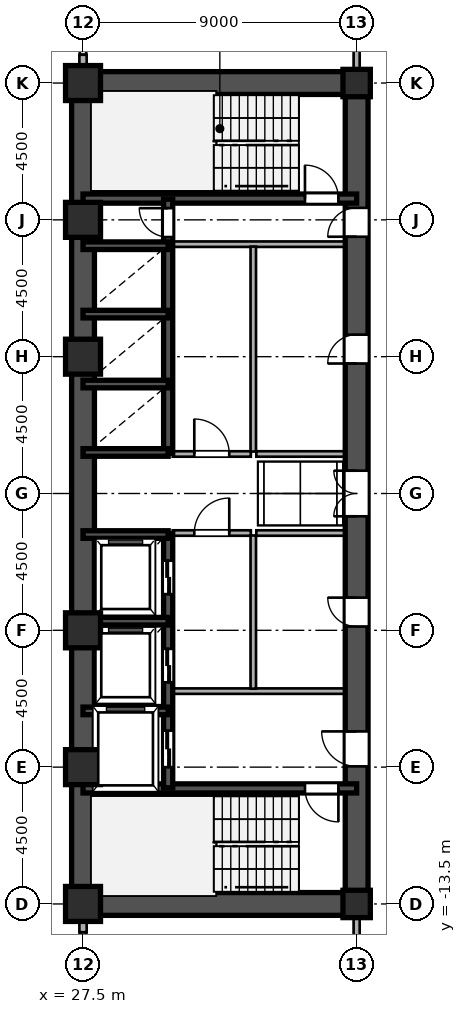
"""IFC4 building model, lengths in metres.
Left out: names, types, materials, properties, quantities, classifications, styles, units other than length and angle.
Written with IfcOpenShell. Run it as: python <this file> out.ifc"""

import sys

from ifc_helpers import new_model, si_unit, direction, frame, frame_2d, origin, origin_2d, place, context, subcontext, project, spatial, rectangle, hollow_rectangle, i_section, extrude, source, transform, mapped, element, fill, save


model = new_model("IFC4")
c1 = context("Model", 3, precision=1e-05, world=origin(), true_north=direction((0.0, 1.0)))
c2 = subcontext(c1, "Body", "Model", "MODEL_VIEW")
j1 = project(units=[si_unit("LENGTHUNIT", "METRE"), si_unit("PLANEANGLEUNIT", "RADIAN")], contexts=[c1])
p1 = place(None, origin())
s1 = spatial("IfcSite", under=j1, at=p1, CompositionType="ELEMENT")
p2 = place(p1, origin())
s2 = spatial("IfcBuilding", under=s1, at=p2, CompositionType="ELEMENT")
p3 = place(p2, frame((0.0, 0.0, 18.9)))
s3 = spatial("IfcBuildingStorey", under=s2, at=p3, CompositionType="ELEMENT", Elevation=18.9)
m1 = source(origin(), c2, "Body", "SweptSolid", [
    extrude(hollow_rectangle(XDim=1.15, YDim=1.15, WallThickness=0.048, at=origin_2d()), origin(), (0.0, 0.0, 1.0), 3.6),
])
for number, where, z_axis, x_axis in (
    (1, (27.5, -13.5, 0.0), (0.0, 0.0, 1.0), (1.0, 0.0, 0.0)),
    (2, (27.5, -9.0, 0.0), (0.0, 0.0, 1.0), (1.0, 0.0, 0.0)),
    (3, (27.5, -4.5, 0.0), (0.0, 0.0, 1.0), (1.0, 0.0, 0.0)),
    (4, (27.5, 4.5, 0.0), (0.0, 0.0, 1.0), (1.0, 0.0, 0.0)),
    (5, (27.5, 9.0, 0.0), (0.0, 0.0, 1.0), (1.0, 0.0, 0.0)),
    (6, (27.5, 13.5, 0.0), (0.0, 0.0, 1.0), (1.0, 0.0, 0.0)),
):
    element("IfcColumn", number, at=place(p3, frame(where, z_axis=z_axis, x_axis=x_axis)), inside=s3, PredefinedType="COLUMN", context=c2, shape_type="MappedRepresentation", body=[
        mapped(m1, transform((0.0, 0.0, 0.0), scale=1.0)),
    ])
m2 = source(origin(), c2, "Body", "SweptSolid", [
    extrude(i_section(OverallWidth=0.9, OverallDepth=0.9, WebThickness=0.036, FlangeThickness=0.055, at=origin_2d()), origin(), (0.0, 0.0, 1.0), 3.6),
])
for number, where, z_axis, x_axis in (
    (7, (36.5, -13.5, 0.0), (0.0, 0.0, 1.0), (1.0, 0.0, 0.0)),
    (8, (36.5, 13.5, 0.0), (0.0, 0.0, 1.0), (1.0, 0.0, 0.0)),
):
    element("IfcColumn", number, at=place(p3, frame(where, z_axis=z_axis, x_axis=x_axis)), inside=s3, PredefinedType="COLUMN", context=c2, shape_type="MappedRepresentation", body=[
        mapped(m2, transform((0.0, 0.0, 0.0), scale=1.0)),
    ])
for number, where, z_axis, x_axis in (
    (9, (27.5, -14.43, 0.0), (0.0, 0.0, 1.0), (0.0, 1.0, 0.0)),
    (10, (27.5, 13.88, 0.0), (0.0, 0.0, 1.0), (0.0, 1.0, 0.0)),
):
    element("IfcWall", number, at=place(p3, frame(where, z_axis=z_axis, x_axis=x_axis)), inside=s3, PredefinedType="SOLIDWALL", context=c2, shape_type="SweptSolid", body=[
        extrude(rectangle(XDim=0.55, YDim=0.24, at=frame_2d((0.275, 0.0))), origin(), (0.0, 0.0, 1.0), 2.88),
    ])
for number, where, z_axis, x_axis in (
    (11, (27.5, -13.5, 0.0), (0.0, 0.0, 1.0), (0.0, 1.0, 0.0)),
    (12, (27.5, 1.3, 0.0), (0.0, 0.0, 1.0), (0.0, 1.0, 0.0)),
):
    element("IfcWall", number, at=place(p3, frame(where, z_axis=z_axis, x_axis=x_axis)), inside=s3, PredefinedType="SHEAR", context=c2, shape_type="SweptSolid", body=[
        extrude(rectangle(XDim=12.2, YDim=0.75, at=frame_2d((6.1, 0.0))), origin(), (0.0, 0.0, 1.0), 3.38),
    ])
p4 = place(p3, frame((27.5, -1.3, 0.0), z_axis=(0.0, 0.0, 1.0), x_axis=(0.0, 1.0, 0.0)))
e13 = element("IfcWall", 13, at=p4, inside=s3, PredefinedType="SHEAR", context=c2, shape_type="SweptSolid", body=[
    extrude(rectangle(XDim=2.6, YDim=0.75, at=frame_2d((1.3, 0.0))), origin(), (0.0, 0.0, 1.0), 3.38),
])
for number, where, z_axis, x_axis in (
    (14, (27.5, -13.5, 0.0), (0.0, 0.0, 1.0), (1.0, 0.0, 0.0)),
    (15, (27.5, 13.5, 0.0), (0.0, 0.0, 1.0), (1.0, 0.0, 0.0)),
):
    element("IfcWall", number, at=place(p3, frame(where, z_axis=z_axis, x_axis=x_axis)), inside=s3, PredefinedType="SHEAR", context=c2, shape_type="SweptSolid", body=[
        extrude(rectangle(XDim=9.0, YDim=0.75, at=frame_2d((4.5, 0.0))), origin(), (0.0, 0.0, 1.0), 3.38),
    ])
p5 = place(p3, frame((36.5, -13.65, 0.0), z_axis=(0.0, 0.0, 1.0), x_axis=(0.0, 1.0, 0.0)))
e16 = element("IfcWall", 16, at=p5, inside=s3, PredefinedType="SHEAR", context=c2, shape_type="SweptSolid", body=[
    extrude(rectangle(XDim=7.15, YDim=0.75, at=frame_2d((3.575, 0.0))), origin(), (0.0, 0.0, 1.0), 3.38),
])
p6 = place(p5, frame((4.675, 0.0, 0.0)))
e17 = element("IfcOpeningElement", 17, at=p6, cuts=e16, PredefinedType="OPENING", context=c2, shape_type="SweptSolid", body=[
    extrude(rectangle(XDim=1.15, YDim=2.2, at=frame_2d((0.575, 1.1))), frame((0.0, 0.385, 0.0), z_axis=(0.0, -1.0, 0.0), x_axis=(1.0, 0.0, 0.0)), (0.0, 0.0, 1.0), 0.77),
])
p7 = place(p3, frame((36.5, -1.3, 0.0), z_axis=(0.0, 0.0, 1.0), x_axis=(0.0, 1.0, 0.0)))
e18 = element("IfcWall", 18, at=p7, inside=s3, PredefinedType="SHEAR", context=c2, shape_type="SweptSolid", body=[
    extrude(rectangle(XDim=2.6, YDim=0.75, at=frame_2d((1.3, 0.0))), origin(), (0.0, 0.0, 1.0), 3.38),
])
p8 = place(p7, frame((0.55, 0.0, 0.0)))
e19 = element("IfcOpeningElement", 19, at=p8, cuts=e18, PredefinedType="OPENING", context=c2, shape_type="SweptSolid", body=[
    extrude(rectangle(XDim=1.5, YDim=2.3, at=frame_2d((0.75, 1.15))), frame((0.0, 0.385, 0.0), z_axis=(0.0, -1.0, 0.0), x_axis=(1.0, 0.0, 0.0)), (0.0, 0.0, 1.0), 0.77),
])
p9 = place(p3, frame((36.5, 8.2, 0.0), z_axis=(0.0, 0.0, 1.0), x_axis=(0.0, 1.0, 0.0)))
e20 = element("IfcWall", 20, at=p9, inside=s3, PredefinedType="SHEAR", context=c2, shape_type="SweptSolid", body=[
    extrude(rectangle(XDim=5.45, YDim=0.75, at=frame_2d((2.725, 0.0))), origin(), (0.0, 0.0, 1.0), 3.38),
])
p10 = place(p9, frame((0.245, 0.0, 0.0)))
e21 = element("IfcOpeningElement", 21, at=p10, cuts=e20, PredefinedType="OPENING", context=c2, shape_type="SweptSolid", body=[
    extrude(rectangle(XDim=0.95, YDim=2.15, at=frame_2d((0.475, 1.075))), frame((0.0, 0.385, 0.0), z_axis=(0.0, -1.0, 0.0), x_axis=(1.0, 0.0, 0.0)), (0.0, 0.0, 1.0), 0.77),
])
p11 = place(p3, frame((36.5, -6.5, 0.0), z_axis=(0.0, 0.0, 1.0), x_axis=(0.0, 1.0, 0.0)))
e22 = element("IfcWall", 22, at=p11, inside=s3, PredefinedType="SHEAR", context=c2, shape_type="SweptSolid", body=[
    extrude(rectangle(XDim=5.2, YDim=0.75, at=frame_2d((2.6, 0.0))), origin(), (0.0, 0.0, 1.0), 3.38),
])
p12 = place(p11, frame((2.125, 0.0, 0.0)))
e23 = element("IfcOpeningElement", 23, at=p12, cuts=e22, PredefinedType="OPENING", context=c2, shape_type="SweptSolid", body=[
    extrude(rectangle(XDim=0.95, YDim=2.15, at=frame_2d((0.475, 1.075))), frame((0.0, 0.385, 0.0), z_axis=(0.0, -1.0, 0.0), x_axis=(1.0, 0.0, 0.0)), (0.0, 0.0, 1.0), 0.77),
])
p13 = place(p3, frame((36.5, 1.3, 0.0), z_axis=(0.0, 0.0, 1.0), x_axis=(0.0, 1.0, 0.0)))
e24 = element("IfcWall", 24, at=p13, inside=s3, PredefinedType="SHEAR", context=c2, shape_type="SweptSolid", body=[
    extrude(rectangle(XDim=6.9, YDim=0.75, at=frame_2d((3.45, 0.0))), origin(), (0.0, 0.0, 1.0), 3.38),
])
p14 = place(p13, frame((2.975, 0.0, 0.0)))
e25 = element("IfcOpeningElement", 25, at=p14, cuts=e24, PredefinedType="OPENING", context=c2, shape_type="SweptSolid", body=[
    extrude(rectangle(XDim=0.95, YDim=2.15, at=frame_2d((0.475, 1.075))), frame((0.0, 0.385, 0.0), z_axis=(0.0, -1.0, 0.0), x_axis=(1.0, 0.0, 0.0)), (0.0, 0.0, 1.0), 0.77),
])
p15 = place(p3, frame((27.5, -9.7, 0.0), z_axis=(0.0, 0.0, 1.0), x_axis=(1.0, 0.0, 0.0)))
e26 = element("IfcWall", 26, at=p15, inside=s3, PredefinedType="SHEAR", context=c2, shape_type="SweptSolid", body=[
    extrude(rectangle(XDim=9.0, YDim=0.3, at=frame_2d((4.5, 0.0))), origin(), (0.0, 0.0, 1.0), 3.38),
])
p16 = place(p15, frame((7.3, 0.0, 0.0)))
e27 = element("IfcOpeningElement", 27, at=p16, cuts=e26, PredefinedType="OPENING", context=c2, shape_type="SweptSolid", body=[
    extrude(rectangle(XDim=1.1, YDim=2.2, at=frame_2d((0.55, 1.1))), frame((0.0, 0.16, 0.0), z_axis=(0.0, -1.0, 0.0), x_axis=(1.0, 0.0, 0.0)), (0.0, 0.0, 1.0), 0.32),
])
p17 = place(p3, frame((27.5, 9.7, 0.0), z_axis=(0.0, 0.0, 1.0), x_axis=(1.0, 0.0, 0.0)))
e28 = element("IfcWall", 28, at=p17, inside=s3, PredefinedType="SHEAR", context=c2, shape_type="SweptSolid", body=[
    extrude(rectangle(XDim=9.0, YDim=0.3, at=frame_2d((4.5, 0.0))), origin(), (0.0, 0.0, 1.0), 3.38),
])
p18 = place(p17, frame((7.3, 0.0, 0.0)))
e29 = element("IfcOpeningElement", 29, at=p18, cuts=e28, PredefinedType="OPENING", context=c2, shape_type="SweptSolid", body=[
    extrude(rectangle(XDim=1.1, YDim=2.2, at=frame_2d((0.55, 1.1))), frame((0.0, 0.16, 0.0), z_axis=(0.0, -1.0, 0.0), x_axis=(1.0, 0.0, 0.0)), (0.0, 0.0, 1.0), 0.32),
])
for number, where, z_axis, x_axis in (
    (30, (27.5, -7.15, 0.0), (0.0, 0.0, 1.0), (1.0, 0.0, 0.0)),
    (31, (27.5, -4.2, 0.0), (0.0, 0.0, 1.0), (1.0, 0.0, 0.0)),
    (32, (27.5, -1.35, 0.0), (0.0, 0.0, 1.0), (1.0, 0.0, 0.0)),
    (33, (27.5, 1.35, 0.0), (0.0, 0.0, 1.0), (1.0, 0.0, 0.0)),
    (34, (27.5, 3.6, 0.0), (0.0, 0.0, 1.0), (1.0, 0.0, 0.0)),
    (35, (27.5, 5.9, 0.0), (0.0, 0.0, 1.0), (1.0, 0.0, 0.0)),
    (36, (27.5, 8.15, 0.0), (0.0, 0.0, 1.0), (1.0, 0.0, 0.0)),
):
    element("IfcWall", number, at=place(p3, frame(where, z_axis=z_axis, x_axis=x_axis)), inside=s3, PredefinedType="SHEAR", context=c2, shape_type="SweptSolid", body=[
        extrude(rectangle(XDim=2.8, YDim=0.25, at=frame_2d((1.4, 0.0))), origin(), (0.0, 0.0, 1.0), 3.38),
    ])
p19 = place(p3, frame((30.3, -9.68, 0.0), z_axis=(0.0, 0.0, 1.0), x_axis=(0.0, 1.0, 0.0)))
e37 = element("IfcWall", 37, at=p19, inside=s3, PredefinedType="SHEAR", context=c2, shape_type="SweptSolid", body=[
    extrude(rectangle(XDim=2.56, YDim=0.3, at=frame_2d((1.28, 0.0))), origin(), (0.0, 0.0, 1.0), 3.38),
])
p20 = place(p19, frame((0.68, 0.0, 0.0)))
e38 = element("IfcOpeningElement", 38, at=p20, cuts=e37, PredefinedType="OPENING", context=c2, shape_type="SweptSolid", body=[
    extrude(rectangle(XDim=1.2, YDim=2.25, at=frame_2d((0.6, 1.125))), frame((0.0, 0.16, 0.0), z_axis=(0.0, -1.0, 0.0), x_axis=(1.0, 0.0, 0.0)), (0.0, 0.0, 1.0), 0.32),
])
p21 = place(p3, frame((30.3, -7.12, 0.0), z_axis=(0.0, 0.0, 1.0), x_axis=(0.0, 1.0, 0.0)))
e39 = element("IfcWall", 39, at=p21, inside=s3, PredefinedType="SHEAR", context=c2, shape_type="SweptSolid", body=[
    extrude(rectangle(XDim=2.92, YDim=0.3, at=frame_2d((1.46, 0.0))), origin(), (0.0, 0.0, 1.0), 3.38),
])
p22 = place(p21, frame((0.91, 0.0, 0.0)))
e40 = element("IfcOpeningElement", 40, at=p22, cuts=e39, PredefinedType="OPENING", context=c2, shape_type="SweptSolid", body=[
    extrude(rectangle(XDim=1.1, YDim=2.2, at=frame_2d((0.55, 1.1))), frame((0.0, 0.16, 0.0), z_axis=(0.0, -1.0, 0.0), x_axis=(1.0, 0.0, 0.0)), (0.0, 0.0, 1.0), 0.32),
])
p23 = place(p3, frame((30.3, -4.2, 0.0), z_axis=(0.0, 0.0, 1.0), x_axis=(0.0, 1.0, 0.0)))
e41 = element("IfcWall", 41, at=p23, inside=s3, PredefinedType="SHEAR", context=c2, shape_type="SweptSolid", body=[
    extrude(rectangle(XDim=2.88, YDim=0.3, at=frame_2d((1.44, 0.0))), origin(), (0.0, 0.0, 1.0), 3.38),
])
p24 = place(p23, frame((0.89, 0.0, 0.0)))
e42 = element("IfcOpeningElement", 42, at=p24, cuts=e41, PredefinedType="OPENING", context=c2, shape_type="SweptSolid", body=[
    extrude(rectangle(XDim=1.1, YDim=2.2, at=frame_2d((0.55, 1.1))), frame((0.0, 0.16, 0.0), z_axis=(0.0, -1.0, 0.0), x_axis=(1.0, 0.0, 0.0)), (0.0, 0.0, 1.0), 0.32),
])
p25 = place(p3, frame((30.3, 1.32, 0.0), z_axis=(0.0, 0.0, 1.0), x_axis=(0.0, 1.0, 0.0)))
e43 = element("IfcWall", 43, at=p25, inside=s3, PredefinedType="SHEAR", context=c2, shape_type="SweptSolid", body=[
    extrude(rectangle(XDim=2.28, YDim=0.3, at=frame_2d((1.14, 0.0))), origin(), (0.0, 0.0, 1.0), 3.38),
])
p26 = place(p3, frame((30.3, 3.6, 0.0), z_axis=(0.0, 0.0, 1.0), x_axis=(0.0, 1.0, 0.0)))
e44 = element("IfcWall", 44, at=p26, inside=s3, PredefinedType="SHEAR", context=c2, shape_type="SweptSolid", body=[
    extrude(rectangle(XDim=2.3, YDim=0.3, at=frame_2d((1.15, 0.0))), origin(), (0.0, 0.0, 1.0), 3.38),
])
p27 = place(p3, frame((30.3, 5.9, 0.0), z_axis=(0.0, 0.0, 1.0), x_axis=(0.0, 1.0, 0.0)))
e45 = element("IfcWall", 45, at=p27, inside=s3, PredefinedType="SHEAR", context=c2, shape_type="SweptSolid", body=[
    extrude(rectangle(XDim=2.25, YDim=0.3, at=frame_2d((1.125, 0.0))), origin(), (0.0, 0.0, 1.0), 3.38),
])
p28 = place(p3, frame((30.3, 8.15, 0.0), z_axis=(0.0, 0.0, 1.0), x_axis=(0.0, 1.0, 0.0)))
e46 = element("IfcWall", 46, at=p28, inside=s3, PredefinedType="SHEAR", context=c2, shape_type="SweptSolid", body=[
    extrude(rectangle(XDim=1.53, YDim=0.3, at=frame_2d((0.765, 0.0))), origin(), (0.0, 0.0, 1.0), 3.38),
])
p29 = place(p28, frame((0.285, 0.0, 0.0)))
e47 = element("IfcOpeningElement", 47, at=p29, cuts=e46, PredefinedType="OPENING", context=c2, shape_type="SweptSolid", body=[
    extrude(rectangle(XDim=0.95, YDim=2.15, at=frame_2d((0.475, 1.075))), frame((0.0, 0.16, 0.0), z_axis=(0.0, -1.0, 0.0), x_axis=(1.0, 0.0, 0.0)), (0.0, 0.0, 1.0), 0.32),
])
for number, where, z_axis, x_axis in (
    (48, (30.45, -6.5, 0.0), (0.0, 0.0, 1.0), (1.0, 0.0, 0.0)),
    (49, (30.45, 8.2, 0.0), (0.0, 0.0, 1.0), (1.0, 0.0, 0.0)),
):
    element("IfcWall", number, at=place(p3, frame(where, z_axis=z_axis, x_axis=x_axis)), inside=s3, PredefinedType="PARTITIONING", context=c2, shape_type="SweptSolid", body=[
        extrude(rectangle(XDim=5.7, YDim=0.18, at=frame_2d((2.85, 0.0))), origin(), (0.0, 0.0, 1.0), 3.38),
    ])
p30 = place(p3, frame((33.1, -6.42, 0.0), z_axis=(0.0, 0.0, 1.0), x_axis=(0.0, 1.0, 0.0)))
e50 = element("IfcWall", 50, at=p30, inside=s3, PredefinedType="PARTITIONING", context=c2, shape_type="SweptSolid", body=[
    extrude(rectangle(XDim=5.04, YDim=0.18, at=frame_2d((2.52, 0.0))), origin(), (0.0, 0.0, 1.0), 3.38),
])
p31 = place(p3, frame((33.1, 1.38, 0.0), z_axis=(0.0, 0.0, 1.0), x_axis=(0.0, 1.0, 0.0)))
e51 = element("IfcWall", 51, at=p31, inside=s3, PredefinedType="PARTITIONING", context=c2, shape_type="SweptSolid", body=[
    extrude(rectangle(XDim=6.74, YDim=0.18, at=frame_2d((3.37, 0.0))), origin(), (0.0, 0.0, 1.0), 3.38),
])
p32 = place(p3, frame((30.45, -1.3, 0.0), z_axis=(0.0, 0.0, 1.0), x_axis=(1.0, 0.0, 0.0)))
e52 = element("IfcWall", 52, at=p32, inside=s3, PredefinedType="PARTITIONING", context=c2, shape_type="SweptSolid", body=[
    extrude(rectangle(XDim=2.57, YDim=0.18, at=frame_2d((1.285, 0.0))), origin(), (0.0, 0.0, 1.0), 3.38),
])
p33 = place(p32, frame((0.71, 0.0, 0.0)))
e53 = element("IfcOpeningElement", 53, at=p33, cuts=e52, PredefinedType="OPENING", context=c2, shape_type="SweptSolid", body=[
    extrude(rectangle(XDim=1.15, YDim=2.2, at=frame_2d((0.575, 1.1))), frame((0.0, 0.1, 0.0), z_axis=(0.0, -1.0, 0.0), x_axis=(1.0, 0.0, 0.0)), (0.0, 0.0, 1.0), 0.2),
])
p34 = place(p3, frame((30.45, 1.3, 0.0), z_axis=(0.0, 0.0, 1.0), x_axis=(1.0, 0.0, 0.0)))
e54 = element("IfcWall", 54, at=p34, inside=s3, PredefinedType="PARTITIONING", context=c2, shape_type="SweptSolid", body=[
    extrude(rectangle(XDim=2.57, YDim=0.18, at=frame_2d((1.285, 0.0))), origin(), (0.0, 0.0, 1.0), 3.38),
])
p35 = place(p34, frame((0.71, 0.0, 0.0)))
e55 = element("IfcOpeningElement", 55, at=p35, cuts=e54, PredefinedType="OPENING", context=c2, shape_type="SweptSolid", body=[
    extrude(rectangle(XDim=1.15, YDim=2.2, at=frame_2d((0.575, 1.1))), frame((0.0, 0.1, 0.0), z_axis=(0.0, -1.0, 0.0), x_axis=(1.0, 0.0, 0.0)), (0.0, 0.0, 1.0), 0.2),
])
for number, where, z_axis, x_axis in (
    (56, (33.2, -1.3, 0.0), (0.0, 0.0, 1.0), (1.0, 0.0, 0.0)),
    (57, (33.2, 1.3, 0.0), (0.0, 0.0, 1.0), (1.0, 0.0, 0.0)),
):
    element("IfcWall", number, at=place(p3, frame(where, z_axis=z_axis, x_axis=x_axis)), inside=s3, PredefinedType="PARTITIONING", context=c2, shape_type="SweptSolid", body=[
        extrude(rectangle(XDim=2.95, YDim=0.18, at=frame_2d((1.475, 0.0))), origin(), (0.0, 0.0, 1.0), 3.38),
    ])
for number, where, z_axis, x_axis in (
    (58, (36.5, -15.515, 0.0), (0.0, 0.0, 1.0), (0.0, 1.0, 0.0)),
    (59, (36.5, 13.88, 0.0), (0.0, 0.0, 1.0), (0.0, 1.0, 0.0)),
):
    element("IfcWall", number, at=place(p3, frame(where, z_axis=z_axis, x_axis=x_axis)), inside=s3, PredefinedType="PARTITIONING", context=c2, shape_type="SweptSolid", body=[
        extrude(rectangle(XDim=1.635, YDim=0.2, at=frame_2d((0.817, 0.0))), origin(), (0.0, 0.0, 1.0), 2.68),
    ])
m3 = source(origin(), c2, "Body", "SweptSolid", [
    extrude(rectangle(XDim=1.15, YDim=2.2, at=frame_2d((0.575, 1.1))), frame((0.0, 0.025, 0.0), z_axis=(0.0, -1.0, 0.0), x_axis=(1.0, 0.0, 0.0)), (0.0, 0.0, 1.0), 0.05),
])
p36 = place(p6, origin())
e60 = element("IfcDoor", 60, at=p36, inside=s3, OperationType="SINGLE_SWING_RIGHT", PredefinedType="DOOR", context=c2, shape_type="MappedRepresentation", body=[
    mapped(m3, transform((0.0, 0.0, 0.0), scale=1.0)),
])
fill(e17, e60)
m4 = source(origin(), c2, "Body", "SweptSolid", [
    extrude(rectangle(XDim=1.5, YDim=2.3, at=frame_2d((0.75, 1.15))), frame((0.0, 0.025, 0.0), z_axis=(0.0, -1.0, 0.0), x_axis=(1.0, 0.0, 0.0)), (0.0, 0.0, 1.0), 0.05),
])
p37 = place(p8, origin())
e61 = element("IfcDoor", 61, at=p37, inside=s3, OperationType="DOUBLE_SWING_LEFT", PredefinedType="DOOR", context=c2, shape_type="MappedRepresentation", body=[
    mapped(m4, transform((0.0, 0.0, 0.0), scale=1.0)),
])
fill(e19, e61)
m5 = source(origin(), c2, "Body", "SweptSolid", [
    extrude(rectangle(XDim=0.95, YDim=2.15, at=frame_2d((0.475, 1.075))), frame((0.0, 0.025, 0.0), z_axis=(0.0, -1.0, 0.0), x_axis=(1.0, 0.0, 0.0)), (0.0, 0.0, 1.0), 0.05),
])
p38 = place(p10, origin())
e62 = element("IfcDoor", 62, at=p38, inside=s3, OperationType="SINGLE_SWING_LEFT", PredefinedType="DOOR", context=c2, shape_type="MappedRepresentation", body=[
    mapped(m5, transform((0.0, 0.0, 0.0), scale=1.0)),
])
fill(e21, e62)
p39 = place(p12, origin())
e63 = element("IfcDoor", 63, at=p39, inside=s3, OperationType="SINGLE_SWING_RIGHT", PredefinedType="DOOR", context=c2, shape_type="MappedRepresentation", body=[
    mapped(m5, transform((0.0, 0.0, 0.0), scale=1.0)),
])
fill(e23, e63)
p40 = place(p14, origin())
e64 = element("IfcDoor", 64, at=p40, inside=s3, OperationType="SINGLE_SWING_LEFT", PredefinedType="DOOR", context=c2, shape_type="MappedRepresentation", body=[
    mapped(m5, transform((0.0, 0.0, 0.0), scale=1.0)),
])
fill(e25, e64)
m6 = source(origin(), c2, "Body", "SweptSolid", [
    extrude(rectangle(XDim=1.1, YDim=2.2, at=frame_2d((0.55, 1.1))), frame((0.0, 0.025, 0.0), z_axis=(0.0, -1.0, 0.0), x_axis=(1.0, 0.0, 0.0)), (0.0, 0.0, 1.0), 0.05),
])
p41 = place(p16, frame((1.1, 0.0, 0.0), z_axis=(0.0, 0.0, 1.0), x_axis=(-1.0, 0.0, 0.0)))
e65 = element("IfcDoor", 65, at=p41, inside=s3, OperationType="SINGLE_SWING_RIGHT", PredefinedType="DOOR", context=c2, shape_type="MappedRepresentation", body=[
    mapped(m6, transform((0.0, 0.0, 0.0), scale=1.0)),
])
fill(e27, e65)
p42 = place(p18, origin())
e66 = element("IfcDoor", 66, at=p42, inside=s3, OperationType="SINGLE_SWING_LEFT", PredefinedType="DOOR", context=c2, shape_type="MappedRepresentation", body=[
    mapped(m6, transform((0.0, 0.0, 0.0), scale=1.0)),
])
fill(e29, e66)
m7 = source(origin(), c2, "Body", "SweptSolid", [
    extrude(rectangle(XDim=1.2, YDim=2.25, at=frame_2d((0.6, 1.125))), frame((0.0, 0.025, 0.0), z_axis=(0.0, -1.0, 0.0), x_axis=(1.0, 0.0, 0.0)), (0.0, 0.0, 1.0), 0.05),
])
p43 = place(p20, origin())
e67 = element("IfcDoor", 67, at=p43, inside=s3, OperationType="DOUBLE_DOOR_SLIDING", PredefinedType="DOOR", context=c2, shape_type="MappedRepresentation", body=[
    mapped(m7, transform((0.0, 0.0, 0.0), scale=1.0)),
])
fill(e38, e67)
m8 = source(origin(), c2, "Body", "SweptSolid", [
    extrude(rectangle(XDim=1.1, YDim=2.2, at=frame_2d((0.55, 1.1))), frame((0.0, 0.025, 0.0), z_axis=(0.0, -1.0, 0.0), x_axis=(1.0, 0.0, 0.0)), (0.0, 0.0, 1.0), 0.05),
])
p44 = place(p22, origin())
e68 = element("IfcDoor", 68, at=p44, inside=s3, OperationType="DOUBLE_DOOR_SLIDING", PredefinedType="DOOR", context=c2, shape_type="MappedRepresentation", body=[
    mapped(m8, transform((0.0, 0.0, 0.0), scale=1.0)),
])
fill(e40, e68)
p45 = place(p24, origin())
e69 = element("IfcDoor", 69, at=p45, inside=s3, OperationType="DOUBLE_DOOR_SLIDING", PredefinedType="DOOR", context=c2, shape_type="MappedRepresentation", body=[
    mapped(m8, transform((0.0, 0.0, 0.0), scale=1.0)),
])
fill(e42, e69)
p46 = place(p29, origin())
e70 = element("IfcDoor", 70, at=p46, inside=s3, OperationType="SINGLE_SWING_RIGHT", PredefinedType="DOOR", context=c2, shape_type="MappedRepresentation", body=[
    mapped(m5, transform((0.0, 0.0, 0.0), scale=1.0)),
])
fill(e47, e70)
p47 = place(p33, origin())
e71 = element("IfcDoor", 71, at=p47, inside=s3, OperationType="SINGLE_SWING_RIGHT", PredefinedType="DOOR", context=c2, shape_type="MappedRepresentation", body=[
    mapped(m3, transform((0.0, 0.0, 0.0), scale=1.0)),
])
fill(e53, e71)
p48 = place(p35, origin())
e72 = element("IfcDoor", 72, at=p48, inside=s3, OperationType="SINGLE_SWING_LEFT", PredefinedType="DOOR", context=c2, shape_type="MappedRepresentation", body=[
    mapped(m3, transform((0.0, 0.0, 0.0), scale=1.0)),
])
fill(e55, e72)
save(model, sys.argv[1])
